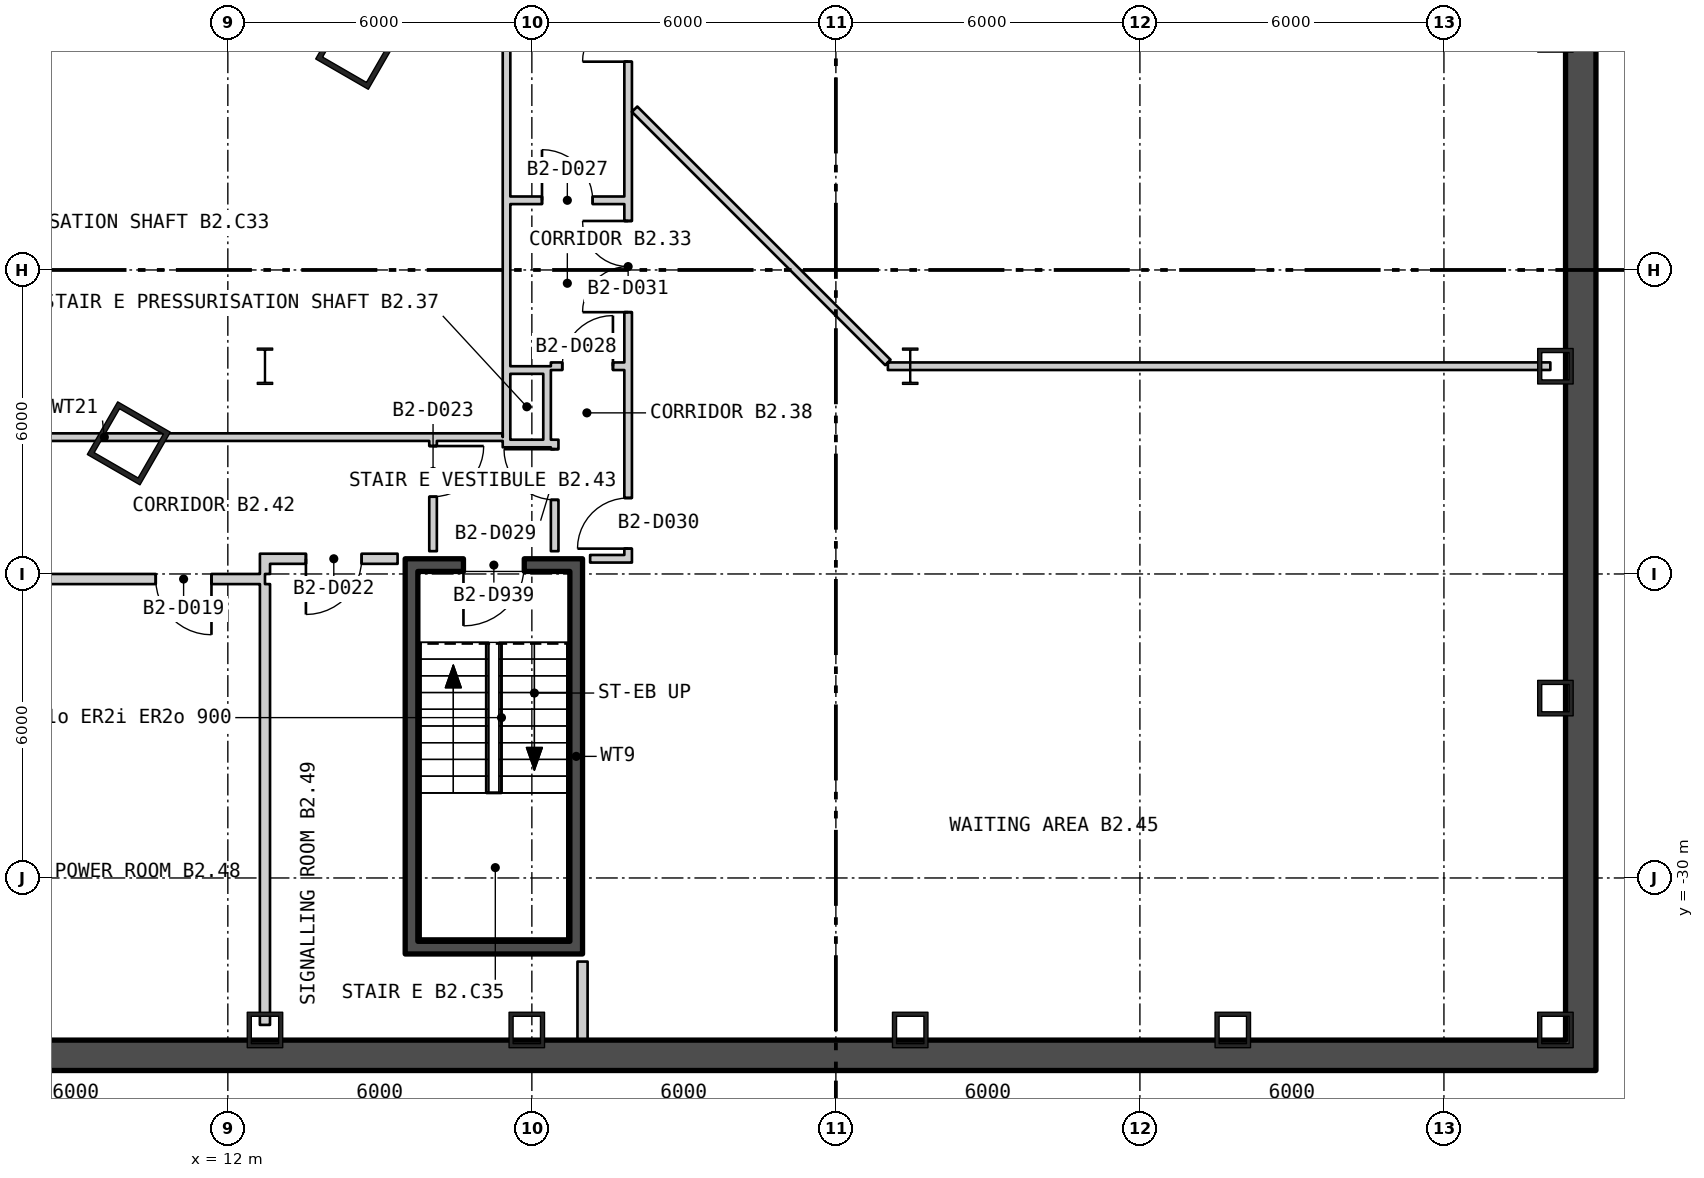
"""IFC4 building model, lengths in metres.
Left out: names, types, materials, properties, quantities, classifications, styles, units other than length and angle.
Written with IfcOpenShell. Run it as: python <this file> out.ifc"""

import sys

from ifc_helpers import new_model, si_unit, direction, frame, frame_2d, origin, origin_2d, place, context, subcontext, project, spatial, rectangle, hollow_rectangle, i_section, extrude, element, fill, save


model = new_model("IFC4")
c1 = context("Model", 3, precision=1e-05, world=origin(), true_north=direction((0.0, 1.0)))
c2 = subcontext(c1, "Body", "Model", "MODEL_VIEW")
j1 = project(units=[si_unit("LENGTHUNIT", "METRE"), si_unit("PLANEANGLEUNIT", "RADIAN")], contexts=[c1])
p1 = place(None, origin())
s1 = spatial("IfcSite", under=j1, at=p1, CompositionType="ELEMENT")
p2 = place(p1, origin())
s2 = spatial("IfcBuilding", under=s1, at=p2, CompositionType="ELEMENT")
p3 = place(p2, frame((0.0, 0.0, -11.4)))
s3 = spatial("IfcBuildingStorey", under=s2, at=p3, CompositionType="ELEMENT", Elevation=-11.4)
for number, where, z_axis, x_axis in (
    (1, (10.046, -21.422, 0.0), (0.0, 0.0, 1.0), (0.5, 0.866, 0.0)),
    (2, (14.553, -13.615, 0.0), (0.0, 0.0, 1.0), (0.5, 0.866, 0.0)),
):
    element("IfcColumn", number, at=place(p3, frame(where, z_axis=z_axis, x_axis=x_axis)), inside=s3, PredefinedType="COLUMN", context=c2, shape_type="SweptSolid", body=[
        extrude(hollow_rectangle(XDim=1.2, YDim=1.2, WallThickness=0.1, at=origin_2d()), origin(), (0.0, 0.0, 1.0), 5.7),
    ])
for number, where, z_axis, x_axis in (
    (3, (38.2, -33.0, 0.0), (0.0, 0.0, 1.0), (0.0, 1.0, 0.0)),
    (4, (38.2, -26.45, 0.0), (0.0, 0.0, 1.0), (0.0, 1.0, 0.0)),
    (5, (38.2, -19.9, 0.0), (0.0, 0.0, 1.0), (0.0, 1.0, 0.0)),
    (6, (12.733, -33.0, 0.0), (0.0, 0.0, 1.0), (1.0, 0.0, 0.0)),
    (7, (17.9, -33.0, 0.0), (0.0, 0.0, 1.0), (1.0, 0.0, 0.0)),
    (8, (25.467, -33.0, 0.0), (0.0, 0.0, 1.0), (1.0, 0.0, 0.0)),
    (9, (31.833, -33.0, 0.0), (0.0, 0.0, 1.0), (1.0, 0.0, 0.0)),
):
    element("IfcColumn", number, at=place(p3, frame(where, z_axis=z_axis, x_axis=x_axis)), inside=s3, PredefinedType="COLUMN", context=c2, shape_type="SweptSolid", body=[
        extrude(hollow_rectangle(XDim=0.7, YDim=0.7, WallThickness=0.08, at=origin_2d()), origin(), (0.0, 0.0, 1.0), 5.7),
    ])
for number, where, z_axis, x_axis in (
    (10, (12.733, -19.9, 0.0), (0.0, 0.0, 1.0), (1.0, 0.0, 0.0)),
    (11, (25.467, -19.9, 0.0), (0.0, 0.0, 1.0), (1.0, 0.0, 0.0)),
):
    element("IfcColumn", number, at=place(p3, frame(where, z_axis=z_axis, x_axis=x_axis)), inside=s3, PredefinedType="COLUMN", context=c2, shape_type="SweptSolid", body=[
        extrude(i_section(OverallWidth=0.304, OverallDepth=0.716, WebThickness=0.021, FlangeThickness=0.04, at=origin_2d()), origin(), (0.0, 0.0, 1.0), 5.7),
    ])
p4 = place(p3, frame((-39.0, -33.5, -0.4), z_axis=(0.0, 0.0, 1.0), x_axis=(1.0, 0.0, 0.0)))
e12 = element("IfcWall", 12, at=p4, inside=s3, PredefinedType="STANDARD", context=c2, shape_type="SweptSolid", body=[
    extrude(rectangle(XDim=78.0, YDim=0.6, at=frame_2d((39.0, 0.0))), origin(), (0.0, 0.0, 1.0), 5.7),
])
p5 = place(p3, frame((38.7, -33.2, -0.4), z_axis=(0.0, 0.0, 1.0), x_axis=(0.0, 1.0, 0.0)))
e13 = element("IfcWall", 13, at=p5, inside=s3, PredefinedType="STANDARD", context=c2, shape_type="SweptSolid", body=[
    extrude(rectangle(XDim=52.8, YDim=0.6, at=frame_2d((26.4, 0.0))), origin(), (0.0, 0.0, 1.0), 5.7),
])
for number, where, z_axis, x_axis in (
    (14, (15.625, -31.25, 0.0), (0.0, 0.0, 1.0), (0.0, 1.0, 0.0)),
    (15, (18.875, -31.25, 0.0), (0.0, 0.0, 1.0), (0.0, 1.0, 0.0)),
):
    element("IfcWall", number, at=place(p3, frame(where, z_axis=z_axis, x_axis=x_axis)), inside=s3, PredefinedType="SHEAR", context=c2, shape_type="SweptSolid", body=[
        extrude(rectangle(XDim=7.3, YDim=0.25, at=frame_2d((3.65, 0.0))), origin(), (0.0, 0.0, 1.0), 5.25),
    ])
p6 = place(p3, frame((15.5, -31.375, 0.0), z_axis=(0.0, 0.0, 1.0), x_axis=(1.0, 0.0, 0.0)))
e16 = element("IfcWall", 16, at=p6, inside=s3, PredefinedType="SHEAR", context=c2, shape_type="SweptSolid", body=[
    extrude(rectangle(XDim=3.5, YDim=0.25, at=frame_2d((1.75, 0.0))), origin(), (0.0, 0.0, 1.0), 5.25),
])
p7 = place(p3, frame((15.5, -23.825, 0.0), z_axis=(0.0, 0.0, 1.0), x_axis=(1.0, 0.0, 0.0)))
e17 = element("IfcWall", 17, at=p7, inside=s3, PredefinedType="SHEAR", context=c2, shape_type="SweptSolid", body=[
    extrude(rectangle(XDim=3.5, YDim=0.25, at=frame_2d((1.75, 0.0))), origin(), (0.0, 0.0, 1.0), 5.25),
])
p8 = place(p7, frame((1.15, 0.0, 0.0)))
e18 = element("IfcOpeningElement", 18, at=p8, cuts=e17, PredefinedType="OPENING", context=c2, shape_type="SweptSolid", body=[
    extrude(rectangle(XDim=1.2, YDim=2.1, at=frame_2d((0.6, 1.05))), frame((0.0, 0.135, 0.0), z_axis=(0.0, -1.0, 0.0), x_axis=(1.0, 0.0, 0.0)), (0.0, 0.0, 1.0), 0.27),
])
p9 = place(p3, frame((-6.367, -24.1, 0.0), z_axis=(0.0, 0.0, 1.0), x_axis=(1.0, 0.0, 0.0)))
e19 = element("IfcWall", 19, at=p9, inside=s3, PredefinedType="PARTITIONING", context=c2, shape_type="SweptSolid", body=[
    extrude(rectangle(XDim=19.1, YDim=0.2, at=frame_2d((9.55, 0.0))), origin(), (0.0, 0.0, 1.0), 5.25),
])
p10 = place(p9, frame((16.944, 0.0, 0.0)))
e20 = element("IfcOpeningElement", 20, at=p10, cuts=e19, PredefinedType="OPENING", context=c2, shape_type="SweptSolid", body=[
    extrude(rectangle(XDim=1.1, YDim=2.1, at=frame_2d((0.55, 1.05))), frame((0.0, 0.11, 0.0), z_axis=(0.0, -1.0, 0.0), x_axis=(1.0, 0.0, 0.0)), (0.0, 0.0, 1.0), 0.22),
])
p11 = place(p3, frame((1.7, -21.3, 0.0), z_axis=(0.0, 0.0, 1.0), x_axis=(0.999999997978, 6.3593005e-05, 0.0)))
e21 = element("IfcWall", 21, at=p11, inside=s3, PredefinedType="PARTITIONING", context=c2, shape_type="SweptSolid", body=[
    extrude(rectangle(XDim=15.725, YDim=0.15, at=frame_2d((7.862, 0.0))), origin(), (0.0, 0.0, 1.0), 5.25),
])
p12 = place(p3, frame((12.732, -32.9, 0.0), z_axis=(0.0, 0.0, 1.0), x_axis=(0.000114942528, 0.999999993394, 0.0)))
e22 = element("IfcWall", 22, at=p12, inside=s3, PredefinedType="PARTITIONING", context=c2, shape_type="SweptSolid", body=[
    extrude(rectangle(XDim=8.7, YDim=0.2, at=frame_2d((4.35, 0.0))), origin(), (0.0, 0.0, 1.0), 5.25),
])
p13 = place(p3, frame((12.733, -24.0, 0.0), z_axis=(0.0, 0.0, 1.0), x_axis=(0.0, 1.0, 0.0)))
e23 = element("IfcWall", 23, at=p13, inside=s3, PredefinedType="PARTITIONING", context=c2, shape_type="SweptSolid", body=[
    extrude(rectangle(XDim=0.4, YDim=0.2, at=frame_2d((0.2, 0.0))), origin(), (0.0, 0.0, 1.0), 5.25),
])
p14 = place(p3, frame((12.833, -23.7, 0.0), z_axis=(0.0, 0.0, 1.0), x_axis=(1.0, 0.0, 0.0)))
e24 = element("IfcWall", 24, at=p14, inside=s3, PredefinedType="PARTITIONING", context=c2, shape_type="SweptSolid", body=[
    extrude(rectangle(XDim=2.517, YDim=0.2, at=frame_2d((1.258, 0.0))), origin(), (0.0, 0.0, 1.0), 5.25),
])
p15 = place(p14, frame((0.708, 0.0, 0.0)))
e25 = element("IfcOpeningElement", 25, at=p15, cuts=e24, PredefinedType="OPENING", context=c2, shape_type="SweptSolid", body=[
    extrude(rectangle(XDim=1.1, YDim=2.1, at=frame_2d((0.55, 1.05))), frame((0.0, 0.11, 0.0), z_axis=(0.0, -1.0, 0.0), x_axis=(1.0, 0.0, 0.0)), (0.0, 0.0, 1.0), 0.22),
])
p16 = place(p3, frame((16.05, -23.55, 0.0), z_axis=(0.0, 0.0, 1.0), x_axis=(0.0, 1.0, 0.0)))
e26 = element("IfcWall", 26, at=p16, inside=s3, PredefinedType="PARTITIONING", context=c2, shape_type="SweptSolid", body=[
    extrude(rectangle(XDim=2.176, YDim=0.15, at=frame_2d((1.088, 0.0))), origin(), (0.0, 0.0, 1.0), 5.25),
])
p17 = place(p16, frame((1.075, 0.0, 0.0)))
e27 = element("IfcOpeningElement", 27, at=p17, cuts=e26, PredefinedType="OPENING", context=c2, shape_type="SweptSolid", body=[
    extrude(rectangle(XDim=1.0, YDim=2.1, at=frame_2d((0.5, 1.05))), frame((0.0, 0.085, 0.0), z_axis=(0.0, -1.0, 0.0), x_axis=(1.0, 0.0, 0.0)), (0.0, 0.0, 1.0), 0.17),
])
p18 = place(p3, frame((17.5, -21.5, 0.0), z_axis=(0.0, 0.0, 1.0), x_axis=(0.0, 1.0, 0.0)))
e28 = element("IfcWall", 28, at=p18, inside=s3, PredefinedType="PARTITIONING", context=c2, shape_type="SweptSolid", body=[
    extrude(rectangle(XDim=1.537, YDim=0.15, at=frame_2d((0.768, 0.0))), origin(), (0.0, 0.0, 1.0), 5.25),
])
p19 = place(p3, frame((17.5, -19.963, 0.0), z_axis=(0.0, 0.0, 1.0), x_axis=(0.0, 1.0, 0.0)))
e29 = element("IfcWall", 29, at=p19, inside=s3, PredefinedType="PARTITIONING", context=c2, shape_type="SweptSolid", body=[
    extrude(rectangle(XDim=7.557, YDim=0.15, at=frame_2d((3.779, 0.0))), origin(), (0.0, 0.0, 1.0), 5.25),
])
for number, where, z_axis, x_axis in (
    (30, (17.575, -21.425, 0.0), (0.0, 0.0, 1.0), (1.0, 0.0, 0.0)),
    (31, (17.575, -19.975, 0.0), (0.0, 0.0, 1.0), (1.0, 0.0, 0.0)),
):
    element("IfcWall", number, at=place(p3, frame(where, z_axis=z_axis, x_axis=x_axis)), inside=s3, PredefinedType="PARTITIONING", context=c2, shape_type="SweptSolid", body=[
        extrude(rectangle(XDim=0.65, YDim=0.15, at=frame_2d((0.325, 0.0))), origin(), (0.0, 0.0, 1.0), 5.25),
    ])
p20 = place(p3, frame((17.575, -16.625, 0.0), z_axis=(0.0, 0.0, 1.0), x_axis=(1.0, 0.0, 0.0)))
e32 = element("IfcWall", 32, at=p20, inside=s3, PredefinedType="PARTITIONING", context=c2, shape_type="SweptSolid", body=[
    extrude(rectangle(XDim=2.25, YDim=0.15, at=frame_2d((1.125, 0.0))), origin(), (0.0, 0.0, 1.0), 5.25),
])
p21 = place(p20, frame((0.625, 0.0, 0.0)))
e33 = element("IfcOpeningElement", 33, at=p21, cuts=e32, PredefinedType="OPENING", context=c2, shape_type="SweptSolid", body=[
    extrude(rectangle(XDim=1.0, YDim=2.1, at=frame_2d((0.5, 1.05))), frame((0.0, 0.085, 0.0), z_axis=(0.0, -1.0, 0.0), x_axis=(1.0, 0.0, 0.0)), (0.0, 0.0, 1.0), 0.17),
])
p22 = place(p3, frame((18.3, -21.5, 0.0), z_axis=(0.0, 0.0, 1.0), x_axis=(0.0, 1.0, 0.0)))
e34 = element("IfcWall", 34, at=p22, inside=s3, PredefinedType="PARTITIONING", context=c2, shape_type="SweptSolid", body=[
    extrude(rectangle(XDim=1.6, YDim=0.15, at=frame_2d((0.8, 0.0))), origin(), (0.0, 0.0, 1.0), 5.25),
])
p23 = place(p3, frame((18.375, -19.9, 0.0), z_axis=(0.0, 0.0, 1.0), x_axis=(1.0, 0.0, 0.0)))
e35 = element("IfcWall", 35, at=p23, inside=s3, PredefinedType="PARTITIONING", context=c2, shape_type="SweptSolid", body=[
    extrude(rectangle(XDim=1.45, YDim=0.15, at=frame_2d((0.725, 0.0))), origin(), (0.0, 0.0, 1.0), 5.25),
])
p24 = place(p23, frame((0.225, 0.0, 0.0)))
e36 = element("IfcOpeningElement", 36, at=p24, cuts=e35, PredefinedType="OPENING", context=c2, shape_type="SweptSolid", body=[
    extrude(rectangle(XDim=1.0, YDim=2.1, at=frame_2d((0.5, 1.05))), frame((0.0, 0.085, 0.0), z_axis=(0.0, -1.0, 0.0), x_axis=(1.0, 0.0, 0.0)), (0.0, 0.0, 1.0), 0.17),
])
p25 = place(p3, frame((18.45, -23.55, 0.0), z_axis=(0.0, 0.0, 1.0), x_axis=(0.0, 1.0, 0.0)))
e37 = element("IfcWall", 37, at=p25, inside=s3, PredefinedType="PARTITIONING", context=c2, shape_type="SweptSolid", body=[
    extrude(rectangle(XDim=2.2, YDim=0.15, at=frame_2d((1.1, 0.0))), origin(), (0.0, 0.0, 1.0), 5.25),
])
p26 = place(p25, frame((1.013, 0.0, 0.0)))
e38 = element("IfcOpeningElement", 38, at=p26, cuts=e37, PredefinedType="OPENING", context=c2, shape_type="SweptSolid", body=[
    extrude(rectangle(XDim=1.0, YDim=2.1, at=frame_2d((0.5, 1.05))), frame((0.0, 0.085, 0.0), z_axis=(0.0, -1.0, 0.0), x_axis=(1.0, 0.0, 0.0)), (0.0, 0.0, 1.0), 0.17),
])
p27 = place(p3, frame((19.0, -33.348, 0.0), z_axis=(0.0, 0.0, 1.0), x_axis=(0.0, 1.0, 0.0)))
e39 = element("IfcWall", 39, at=p27, inside=s3, PredefinedType="PARTITIONING", context=c2, shape_type="SweptSolid", body=[
    extrude(rectangle(XDim=1.698, YDim=0.2, at=frame_2d((0.849, 0.0))), origin(), (0.0, 0.0, 1.0), 5.25),
])
p28 = place(p3, frame((19.15, -23.7, 0.0), z_axis=(0.0, 0.0, 1.0), x_axis=(1.0, 0.0, 0.0)))
e40 = element("IfcWall", 40, at=p28, inside=s3, PredefinedType="PARTITIONING", context=c2, shape_type="SweptSolid", body=[
    extrude(rectangle(XDim=0.675, YDim=0.15, at=frame_2d((0.338, 0.0))), origin(), (0.0, 0.0, 1.0), 5.25),
])
p29 = place(p3, frame((19.9, -23.775, 0.0), z_axis=(0.0, 0.0, 1.0), x_axis=(0.0, 1.0, 0.0)))
e41 = element("IfcWall", 41, at=p29, inside=s3, PredefinedType="PARTITIONING", context=c2, shape_type="SweptSolid", body=[
    extrude(rectangle(XDim=21.187, YDim=0.15, at=frame_2d((10.594, 0.0))), origin(), (0.0, 0.0, 1.0), 5.25),
])
p30 = place(p29, frame((0.275, 0.0, 0.0)))
e42 = element("IfcOpeningElement", 42, at=p30, cuts=e41, PredefinedType="OPENING", context=c2, shape_type="SweptSolid", body=[
    extrude(rectangle(XDim=1.0, YDim=2.1, at=frame_2d((0.5, 1.05))), frame((0.0, 0.085, 0.0), z_axis=(0.0, -1.0, 0.0), x_axis=(1.0, 0.0, 0.0)), (0.0, 0.0, 1.0), 0.17),
])
p31 = place(p29, frame((4.942, 0.0, 0.0)))
e43 = element("IfcOpeningElement", 43, at=p31, cuts=e41, PredefinedType="OPENING", context=c2, shape_type="SweptSolid", body=[
    extrude(rectangle(XDim=1.8, YDim=2.1, at=frame_2d((0.9, 1.05))), frame((0.0, 0.085, 0.0), z_axis=(0.0, -1.0, 0.0), x_axis=(1.0, 0.0, 0.0)), (0.0, 0.0, 1.0), 0.17),
])
p32 = place(p29, frame((9.886, 0.0, 0.0)))
e44 = element("IfcOpeningElement", 44, at=p32, cuts=e41, PredefinedType="OPENING", context=c2, shape_type="SweptSolid", body=[
    extrude(rectangle(XDim=1.8, YDim=2.1, at=frame_2d((0.9, 1.05))), frame((0.0, 0.085, 0.0), z_axis=(0.0, -1.0, 0.0), x_axis=(1.0, 0.0, 0.0)), (0.0, 0.0, 1.0), 0.17),
])
p33 = place(p29, frame((14.973, 0.0, 0.0)))
e45 = element("IfcOpeningElement", 45, at=p33, cuts=e41, PredefinedType="OPENING", context=c2, shape_type="SweptSolid", body=[
    extrude(rectangle(XDim=1.8, YDim=2.1, at=frame_2d((0.9, 1.05))), frame((0.0, 0.085, 0.0), z_axis=(0.0, -1.0, 0.0), x_axis=(1.0, 0.0, 0.0)), (0.0, 0.0, 1.0), 0.17),
])
p34 = place(p29, frame((19.062, 0.0, 0.0)))
e46 = element("IfcOpeningElement", 46, at=p34, cuts=e41, PredefinedType="OPENING", context=c2, shape_type="SweptSolid", body=[
    extrude(rectangle(XDim=1.0, YDim=2.1, at=frame_2d((0.5, 1.05))), frame((0.0, 0.085, 0.0), z_axis=(0.0, -1.0, 0.0), x_axis=(1.0, 0.0, 0.0)), (0.0, 0.0, 1.0), 0.17),
])
p35 = place(p3, frame((20.028, -14.827, 0.0), z_axis=(0.0, 0.0, 1.0), x_axis=(0.707106781187, -0.707106781187, 0.0)))
e47 = element("IfcWall", 47, at=p35, inside=s3, PredefinedType="PARTITIONING", context=c2, shape_type="SweptSolid", body=[
    extrude(rectangle(XDim=7.068, YDim=0.15, at=frame_2d((3.534, 0.0))), origin(), (0.0, 0.0, 1.0), 5.25),
])
p36 = place(p3, frame((25.026, -19.9, 0.0), z_axis=(0.0, 0.0, 1.0), x_axis=(0.999999997075, 7.6487685e-05, 0.0)))
e48 = element("IfcWall", 48, at=p36, inside=s3, PredefinedType="PARTITIONING", context=c2, shape_type="SweptSolid", body=[
    extrude(rectangle(XDim=13.074, YDim=0.15, at=frame_2d((6.537, 0.0))), origin(), (0.0, 0.0, 1.0), 5.25),
])
p37 = place(p8, origin())
e49 = element("IfcDoor", 49, at=p37, inside=s3, OperationType="SINGLE_SWING_LEFT", PredefinedType="DOOR", context=c2, shape_type="SweptSolid", body=[
    extrude(rectangle(XDim=1.2, YDim=2.1, at=frame_2d((0.6, 1.05))), frame((0.0, 0.025, 0.0), z_axis=(0.0, -1.0, 0.0), x_axis=(1.0, 0.0, 0.0)), (0.0, 0.0, 1.0), 0.05),
])
fill(e18, e49)
p38 = place(p10, origin())
e50 = element("IfcDoor", 50, at=p38, inside=s3, OperationType="SINGLE_SWING_RIGHT", PredefinedType="DOOR", context=c2, shape_type="SweptSolid", body=[
    extrude(rectangle(XDim=1.1, YDim=2.1, at=frame_2d((0.55, 1.05))), frame((0.0, 0.025, 0.0), z_axis=(0.0, -1.0, 0.0), x_axis=(1.0, 0.0, 0.0)), (0.0, 0.0, 1.0), 0.05),
])
fill(e20, e50)
p39 = place(p15, origin())
e51 = element("IfcDoor", 51, at=p39, inside=s3, OperationType="SINGLE_SWING_LEFT", PredefinedType="DOOR", context=c2, shape_type="SweptSolid", body=[
    extrude(rectangle(XDim=1.1, YDim=2.1, at=frame_2d((0.55, 1.05))), frame((0.0, 0.025, 0.0), z_axis=(0.0, -1.0, 0.0), x_axis=(1.0, 0.0, 0.0)), (0.0, 0.0, 1.0), 0.05),
])
fill(e25, e51)
p40 = place(p17, origin())
e52 = element("IfcDoor", 52, at=p40, inside=s3, OperationType="SINGLE_SWING_RIGHT", PredefinedType="DOOR", context=c2, shape_type="SweptSolid", body=[
    extrude(rectangle(XDim=1.0, YDim=2.1, at=frame_2d((0.5, 1.05))), frame((0.0, 0.025, 0.0), z_axis=(0.0, -1.0, 0.0), x_axis=(1.0, 0.0, 0.0)), (0.0, 0.0, 1.0), 0.05),
])
fill(e27, e52)
p41 = place(p21, origin())
e53 = element("IfcDoor", 53, at=p41, inside=s3, OperationType="SINGLE_SWING_RIGHT", PredefinedType="DOOR", context=c2, shape_type="SweptSolid", body=[
    extrude(rectangle(XDim=1.0, YDim=2.1, at=frame_2d((0.5, 1.05))), frame((0.0, 0.025, 0.0), z_axis=(0.0, -1.0, 0.0), x_axis=(1.0, 0.0, 0.0)), (0.0, 0.0, 1.0), 0.05),
])
fill(e33, e53)
p42 = place(p24, origin())
e54 = element("IfcDoor", 54, at=p42, inside=s3, OperationType="SINGLE_SWING_LEFT", PredefinedType="DOOR", context=c2, shape_type="SweptSolid", body=[
    extrude(rectangle(XDim=1.0, YDim=2.1, at=frame_2d((0.5, 1.05))), frame((0.0, 0.025, 0.0), z_axis=(0.0, -1.0, 0.0), x_axis=(1.0, 0.0, 0.0)), (0.0, 0.0, 1.0), 0.05),
])
fill(e36, e54)
p43 = place(p26, origin())
e55 = element("IfcDoor", 55, at=p43, inside=s3, OperationType="SINGLE_SWING_LEFT", PredefinedType="DOOR", context=c2, shape_type="SweptSolid", body=[
    extrude(rectangle(XDim=1.0, YDim=2.1, at=frame_2d((0.5, 1.05))), frame((0.0, 0.025, 0.0), z_axis=(0.0, -1.0, 0.0), x_axis=(1.0, 0.0, 0.0)), (0.0, 0.0, 1.0), 0.05),
])
fill(e38, e55)
p44 = place(p30, origin())
e56 = element("IfcDoor", 56, at=p44, inside=s3, OperationType="SINGLE_SWING_RIGHT", PredefinedType="DOOR", context=c2, shape_type="SweptSolid", body=[
    extrude(rectangle(XDim=1.0, YDim=2.1, at=frame_2d((0.5, 1.05))), frame((0.0, 0.025, 0.0), z_axis=(0.0, -1.0, 0.0), x_axis=(1.0, 0.0, 0.0)), (0.0, 0.0, 1.0), 0.05),
])
fill(e42, e56)
p45 = place(p31, origin())
e57 = element("IfcDoor", 57, at=p45, inside=s3, OperationType="DOUBLE_DOOR_SINGLE_SWING", PredefinedType="DOOR", context=c2, shape_type="SweptSolid", body=[
    extrude(rectangle(XDim=1.8, YDim=2.1, at=frame_2d((0.9, 1.05))), frame((0.0, 0.025, 0.0), z_axis=(0.0, -1.0, 0.0), x_axis=(1.0, 0.0, 0.0)), (0.0, 0.0, 1.0), 0.05),
])
fill(e43, e57)
p46 = place(p32, origin())
e58 = element("IfcDoor", 58, at=p46, inside=s3, OperationType="DOUBLE_DOOR_SINGLE_SWING", PredefinedType="DOOR", context=c2, shape_type="SweptSolid", body=[
    extrude(rectangle(XDim=1.8, YDim=2.1, at=frame_2d((0.9, 1.05))), frame((0.0, 0.025, 0.0), z_axis=(0.0, -1.0, 0.0), x_axis=(1.0, 0.0, 0.0)), (0.0, 0.0, 1.0), 0.05),
])
fill(e44, e58)
save(model, sys.argv[1])
